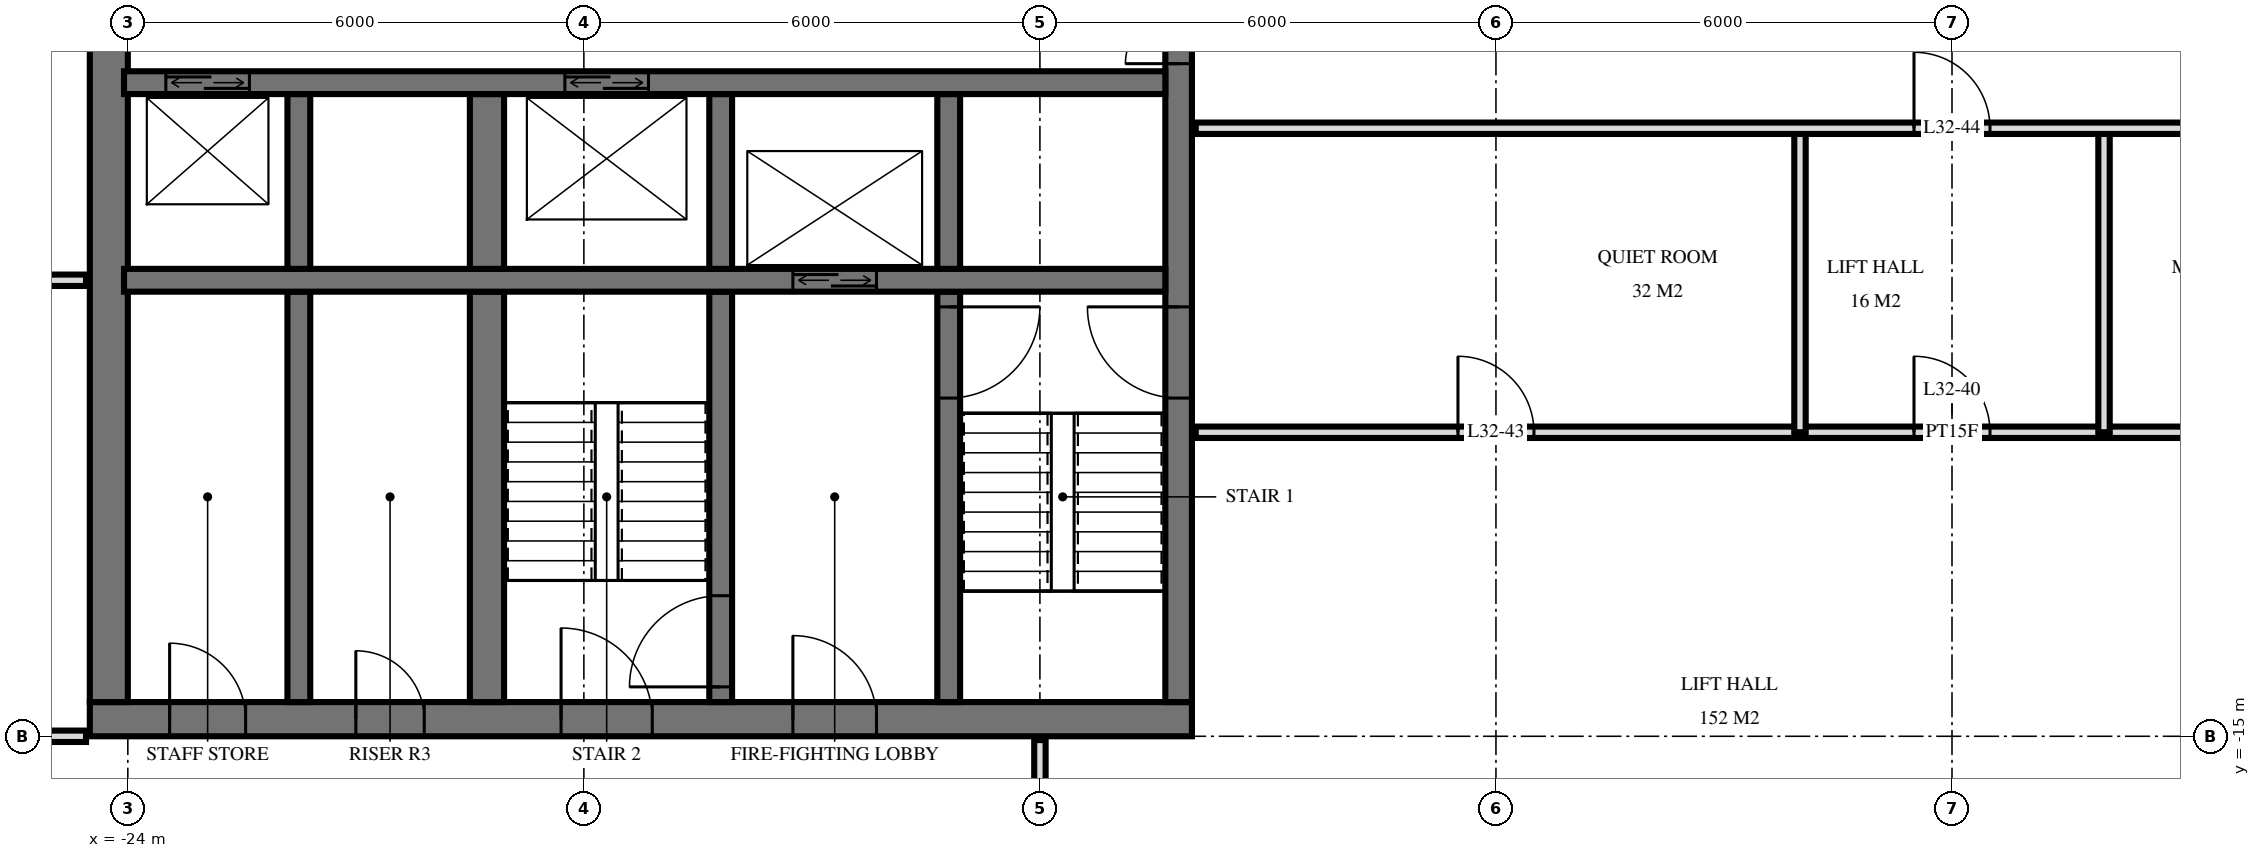
"""IFC4 building model, lengths in metres.
Left out: names, types, materials, properties, quantities, classifications, styles, units other than length and angle.
Written with IfcOpenShell. Run it as: python <this file> out.ifc"""

import sys

from ifc_helpers import new_model, si_unit, direction, frame, frame_2d, origin, place, context, subcontext, project, spatial, rectangle, extrude, element, fill, save


model = new_model("IFC4")
c1 = context("Model", 3, precision=1e-05, world=origin(), true_north=direction((0.0, 1.0)))
c2 = subcontext(c1, "Body", "Model", "MODEL_VIEW")
j1 = project(units=[si_unit("LENGTHUNIT", "METRE"), si_unit("PLANEANGLEUNIT", "RADIAN")], contexts=[c1])
p1 = place(None, origin())
s1 = spatial("IfcSite", under=j1, at=p1, CompositionType="ELEMENT")
p2 = place(p1, origin())
s2 = spatial("IfcBuilding", under=s1, at=p2, CompositionType="ELEMENT")
p3 = place(p2, frame((0.0, 0.0, 127.2)))
s3 = spatial("IfcBuildingStorey", under=s2, at=p3, CompositionType="ELEMENT", Elevation=127.2)
p4 = place(p3, frame((-24.5, -14.775, 0.0), z_axis=(0.0, 0.0, 1.0), x_axis=(1.0, 0.0, 0.0)))
e1 = element("IfcWall", 1, at=p4, inside=s3, PredefinedType="SHEAR", context=c2, shape_type="SweptSolid", body=[
    extrude(rectangle(XDim=14.5, YDim=0.45, at=frame_2d((7.25, 0.0))), origin(), (0.0, 0.0, 1.0), 3.6),
])
p5 = place(p4, frame((6.2, 0.0, 0.0)))
e2 = element("IfcOpeningElement", 2, at=p5, cuts=e1, PredefinedType="OPENING", context=c2, shape_type="SweptSolid", body=[
    extrude(rectangle(XDim=1.2, YDim=2.1, at=frame_2d((0.6, 1.05))), frame((0.0, 0.235, 0.0), z_axis=(0.0, -1.0, 0.0), x_axis=(1.0, 0.0, 0.0)), (0.0, 0.0, 1.0), 0.47),
])
p6 = place(p4, frame((9.25, 0.0, 0.0)))
e3 = element("IfcOpeningElement", 3, at=p6, cuts=e1, PredefinedType="OPENING", context=c2, shape_type="SweptSolid", body=[
    extrude(rectangle(XDim=1.1, YDim=2.1, at=frame_2d((0.55, 1.05))), frame((0.0, 0.235, 0.0), z_axis=(0.0, -1.0, 0.0), x_axis=(1.0, 0.0, 0.0)), (0.0, 0.0, 1.0), 0.47),
])
p7 = place(p4, frame((3.5, 0.0, 0.0)))
e4 = element("IfcOpeningElement", 4, at=p7, cuts=e1, PredefinedType="OPENING", context=c2, shape_type="SweptSolid", body=[
    extrude(rectangle(XDim=0.9, YDim=2.1, at=frame_2d((0.45, 1.05))), frame((0.0, 0.235, 0.0), z_axis=(0.0, -1.0, 0.0), x_axis=(1.0, 0.0, 0.0)), (0.0, 0.0, 1.0), 0.47),
])
p8 = place(p4, frame((1.05, 0.0, 0.0)))
e5 = element("IfcOpeningElement", 5, at=p8, cuts=e1, PredefinedType="OPENING", context=c2, shape_type="SweptSolid", body=[
    extrude(rectangle(XDim=1.0, YDim=2.1, at=frame_2d((0.5, 1.05))), frame((0.0, 0.235, 0.0), z_axis=(0.0, -1.0, 0.0), x_axis=(1.0, 0.0, 0.0)), (0.0, 0.0, 1.0), 0.47),
])
p9 = place(p3, frame((-10.175, -14.55, 0.0), z_axis=(0.0, 0.0, 1.0), x_axis=(0.0, 1.0, 0.0)))
e6 = element("IfcWall", 6, at=p9, inside=s3, PredefinedType="SHEAR", context=c2, shape_type="SweptSolid", body=[
    extrude(rectangle(XDim=14.1, YDim=0.35, at=frame_2d((7.05, 0.0))), origin(), (0.0, 0.0, 1.0), 3.6),
])
p10 = place(p9, frame((8.4, 0.0, 0.0)))
e7 = element("IfcOpeningElement", 7, at=p10, cuts=e6, PredefinedType="OPENING", context=c2, shape_type="SweptSolid", body=[
    extrude(rectangle(XDim=1.4, YDim=2.4, at=frame_2d((0.7, 1.2))), frame((0.0, 0.185, 0.0), z_axis=(0.0, -1.0, 0.0), x_axis=(1.0, 0.0, 0.0)), (0.0, 0.0, 1.0), 0.37),
])
p11 = place(p9, frame((10.0, 0.0, 0.0)))
e8 = element("IfcOpeningElement", 8, at=p11, cuts=e6, PredefinedType="OPENING", context=c2, shape_type="SweptSolid", body=[
    extrude(rectangle(XDim=1.4, YDim=2.4, at=frame_2d((0.7, 1.2))), frame((0.0, 0.185, 0.0), z_axis=(0.0, -1.0, 0.0), x_axis=(1.0, 0.0, 0.0)), (0.0, 0.0, 1.0), 0.37),
])
p12 = place(p9, frame((4.0, 0.0, 0.0)))
e9 = element("IfcOpeningElement", 9, at=p12, cuts=e6, PredefinedType="OPENING", context=c2, shape_type="SweptSolid", body=[
    extrude(rectangle(XDim=1.2, YDim=2.1, at=frame_2d((0.6, 1.05))), frame((0.0, 0.185, 0.0), z_axis=(0.0, -1.0, 0.0), x_axis=(1.0, 0.0, 0.0)), (0.0, 0.0, 1.0), 0.37),
])
p13 = place(p3, frame((-24.25, -14.55, 0.0), z_axis=(0.0, 0.0, 1.0), x_axis=(0.0, 1.0, 0.0)))
e10 = element("IfcWall", 10, at=p13, inside=s3, PredefinedType="SHEAR", context=c2, shape_type="SweptSolid", body=[
    extrude(rectangle(XDim=14.1, YDim=0.5, at=frame_2d((7.05, 0.0))), origin(), (0.0, 0.0, 1.0), 3.6),
])
p14 = place(p3, frame((-24.05, -6.4, 0.0), z_axis=(0.0, 0.0, 1.0), x_axis=(1.0, 0.0, 0.0)))
e11 = element("IfcWall", 11, at=p14, inside=s3, PredefinedType="SHEAR", context=c2, shape_type="SweptSolid", body=[
    extrude(rectangle(XDim=13.7, YDim=0.3, at=frame_2d((6.85, 0.0))), origin(), (0.0, 0.0, 1.0), 3.6),
])
p15 = place(p14, frame((0.55, 0.0, 0.0)))
e12 = element("IfcOpeningElement", 12, at=p15, cuts=e11, PredefinedType="OPENING", context=c2, shape_type="SweptSolid", body=[
    extrude(rectangle(XDim=1.1, YDim=2.1, at=frame_2d((0.55, 1.05))), frame((0.0, 0.16, 0.0), z_axis=(0.0, -1.0, 0.0), x_axis=(1.0, 0.0, 0.0)), (0.0, 0.0, 1.0), 0.32),
])
p16 = place(p14, frame((5.8, 0.0, 0.0)))
e13 = element("IfcOpeningElement", 13, at=p16, cuts=e11, PredefinedType="OPENING", context=c2, shape_type="SweptSolid", body=[
    extrude(rectangle(XDim=1.1, YDim=2.1, at=frame_2d((0.55, 1.05))), frame((0.0, 0.16, 0.0), z_axis=(0.0, -1.0, 0.0), x_axis=(1.0, 0.0, 0.0)), (0.0, 0.0, 1.0), 0.32),
])
p17 = place(p3, frame((-24.05, -9.0, 0.0), z_axis=(0.0, 0.0, 1.0), x_axis=(1.0, 0.0, 0.0)))
e14 = element("IfcWall", 14, at=p17, inside=s3, PredefinedType="SHEAR", context=c2, shape_type="SweptSolid", body=[
    extrude(rectangle(XDim=13.7, YDim=0.3, at=frame_2d((6.85, 0.0))), origin(), (0.0, 0.0, 1.0), 3.6),
])
p18 = place(p17, frame((8.8, 0.0, 0.0)))
e15 = element("IfcOpeningElement", 15, at=p18, cuts=e14, PredefinedType="OPENING", context=c2, shape_type="SweptSolid", body=[
    extrude(rectangle(XDim=1.1, YDim=2.1, at=frame_2d((0.55, 1.05))), frame((0.0, 0.16, 0.0), z_axis=(0.0, -1.0, 0.0), x_axis=(1.0, 0.0, 0.0)), (0.0, 0.0, 1.0), 0.32),
])
p19 = place(p3, frame((-13.2, -8.85, 0.0), z_axis=(0.0, 0.0, 1.0), x_axis=(0.0, 1.0, 0.0)))
e16 = element("IfcWall", 16, at=p19, inside=s3, PredefinedType="SHEAR", context=c2, shape_type="SweptSolid", body=[
    extrude(rectangle(XDim=2.3, YDim=0.3, at=frame_2d((1.15, 0.0))), origin(), (0.0, 0.0, 1.0), 3.6),
])
p20 = place(p3, frame((-13.2, -14.55, 0.0), z_axis=(0.0, 0.0, 1.0), x_axis=(0.0, 1.0, 0.0)))
e17 = element("IfcWall", 17, at=p20, inside=s3, PredefinedType="SHEAR", context=c2, shape_type="SweptSolid", body=[
    extrude(rectangle(XDim=5.4, YDim=0.3, at=frame_2d((2.7, 0.0))), origin(), (0.0, 0.0, 1.0), 3.6),
])
p21 = place(p20, frame((4.0, 0.0, 0.0)))
e18 = element("IfcOpeningElement", 18, at=p21, cuts=e17, PredefinedType="OPENING", context=c2, shape_type="SweptSolid", body=[
    extrude(rectangle(XDim=1.2, YDim=2.1, at=frame_2d((0.6, 1.05))), frame((0.0, 0.16, 0.0), z_axis=(0.0, -1.0, 0.0), x_axis=(1.0, 0.0, 0.0)), (0.0, 0.0, 1.0), 0.32),
])
p22 = place(p3, frame((-16.2, -8.85, 0.0), z_axis=(0.0, 0.0, 1.0), x_axis=(0.0, 1.0, 0.0)))
e19 = element("IfcWall", 19, at=p22, inside=s3, PredefinedType="SHEAR", context=c2, shape_type="SweptSolid", body=[
    extrude(rectangle(XDim=2.3, YDim=0.3, at=frame_2d((1.15, 0.0))), origin(), (0.0, 0.0, 1.0), 3.6),
])
p23 = place(p3, frame((-16.2, -14.55, 0.0), z_axis=(0.0, 0.0, 1.0), x_axis=(0.0, 1.0, 0.0)))
e20 = element("IfcWall", 20, at=p23, inside=s3, PredefinedType="SHEAR", context=c2, shape_type="SweptSolid", body=[
    extrude(rectangle(XDim=5.4, YDim=0.3, at=frame_2d((2.7, 0.0))), origin(), (0.0, 0.0, 1.0), 3.6),
])
p24 = place(p23, frame((0.2, 0.0, 0.0)))
e21 = element("IfcOpeningElement", 21, at=p24, cuts=e20, PredefinedType="OPENING", context=c2, shape_type="SweptSolid", body=[
    extrude(rectangle(XDim=1.2, YDim=2.1, at=frame_2d((0.6, 1.05))), frame((0.0, 0.16, 0.0), z_axis=(0.0, -1.0, 0.0), x_axis=(1.0, 0.0, 0.0)), (0.0, 0.0, 1.0), 0.32),
])
p25 = place(p3, frame((-19.275, -8.85, 0.0), z_axis=(0.0, 0.0, 1.0), x_axis=(0.0, 1.0, 0.0)))
e22 = element("IfcWall", 22, at=p25, inside=s3, PredefinedType="SHEAR", context=c2, shape_type="SweptSolid", body=[
    extrude(rectangle(XDim=2.3, YDim=0.45, at=frame_2d((1.15, 0.0))), origin(), (0.0, 0.0, 1.0), 3.6),
])
p26 = place(p3, frame((-19.275, -14.55, 0.0), z_axis=(0.0, 0.0, 1.0), x_axis=(0.0, 1.0, 0.0)))
e23 = element("IfcWall", 23, at=p26, inside=s3, PredefinedType="SHEAR", context=c2, shape_type="SweptSolid", body=[
    extrude(rectangle(XDim=5.4, YDim=0.45, at=frame_2d((2.7, 0.0))), origin(), (0.0, 0.0, 1.0), 3.6),
])
p27 = place(p3, frame((-21.75, -8.85, 0.0), z_axis=(0.0, 0.0, 1.0), x_axis=(0.0, 1.0, 0.0)))
e24 = element("IfcWall", 24, at=p27, inside=s3, PredefinedType="SHEAR", context=c2, shape_type="SweptSolid", body=[
    extrude(rectangle(XDim=2.3, YDim=0.3, at=frame_2d((1.15, 0.0))), origin(), (0.0, 0.0, 1.0), 3.6),
])
p28 = place(p3, frame((-21.75, -14.55, 0.0), z_axis=(0.0, 0.0, 1.0), x_axis=(0.0, 1.0, 0.0)))
e25 = element("IfcWall", 25, at=p28, inside=s3, PredefinedType="SHEAR", context=c2, shape_type="SweptSolid", body=[
    extrude(rectangle(XDim=5.4, YDim=0.3, at=frame_2d((2.7, 0.0))), origin(), (0.0, 0.0, 1.0), 3.6),
])
for number, where, z_axis, x_axis in (
    (26, (2.0, -11.0, 0.0), (0.0, 0.0, 1.0), (0.0, 1.0, 0.0)),
    (27, (-2.0, -11.0, 0.0), (0.0, 0.0, 1.0), (0.0, 1.0, 0.0)),
):
    element("IfcWall", number, at=place(p3, frame(where, z_axis=z_axis, x_axis=x_axis)), inside=s3, PredefinedType="PARTITIONING", context=c2, shape_type="SweptSolid", body=[
        extrude(rectangle(XDim=4.0, YDim=0.15, at=frame_2d((2.0, 0.0))), origin(), (0.0, 0.0, 1.0), 3.32),
    ])
p29 = place(p3, frame((-12.0, -18.0, 0.0), z_axis=(0.0, 0.0, 1.0), x_axis=(0.0, 1.0, 0.0)))
e28 = element("IfcWall", 28, at=p29, inside=s3, PredefinedType="PARTITIONING", context=c2, shape_type="SweptSolid", body=[
    extrude(rectangle(XDim=2.95, YDim=0.15, at=frame_2d((1.475, 0.0))), origin(), (0.0, 0.0, 1.0), 3.32),
])
p30 = place(p29, frame((1.0, 0.0, 0.0)))
e29 = element("IfcOpeningElement", 29, at=p30, cuts=e28, PredefinedType="OPENING", context=c2, shape_type="SweptSolid", body=[
    extrude(rectangle(XDim=1.0, YDim=2.1, at=frame_2d((0.5, 1.05))), frame((0.0, 0.085, 0.0), z_axis=(0.0, -1.0, 0.0), x_axis=(1.0, 0.0, 0.0)), (0.0, 0.0, 1.0), 0.17),
])
p31 = place(p3, frame((-28.02, -15.0, 0.0), z_axis=(0.0, 0.0, 1.0), x_axis=(1.0, 0.0, 0.0)))
e30 = element("IfcWall", 30, at=p31, inside=s3, PredefinedType="PARTITIONING", context=c2, shape_type="SweptSolid", body=[
    extrude(rectangle(XDim=3.47, YDim=0.15, at=frame_2d((1.735, 0.0))), origin(), (0.0, 0.0, 1.0), 3.32),
])
p32 = place(p31, frame((1.57, 0.0, 0.0)))
e31 = element("IfcOpeningElement", 31, at=p32, cuts=e30, PredefinedType="OPENING", context=c2, shape_type="SweptSolid", body=[
    extrude(rectangle(XDim=1.0, YDim=2.1, at=frame_2d((0.5, 1.05))), frame((0.0, 0.085, 0.0), z_axis=(0.0, -1.0, 0.0), x_axis=(1.0, 0.0, 0.0)), (0.0, 0.0, 1.0), 0.17),
])
p33 = place(p3, frame((-9.95, -11.0, 0.0), z_axis=(0.0, 0.0, 1.0), x_axis=(1.0, 0.0, 0.0)))
e32 = element("IfcWall", 32, at=p33, inside=s3, PredefinedType="PARTITIONING", context=c2, shape_type="SweptSolid", body=[
    extrude(rectangle(XDim=19.9, YDim=0.15, at=frame_2d((9.95, 0.0))), origin(), (0.0, 0.0, 1.0), 3.32),
])
p34 = place(p33, frame((9.45, 0.0, 0.0)))
e33 = element("IfcOpeningElement", 33, at=p34, cuts=e32, PredefinedType="OPENING", context=c2, shape_type="SweptSolid", body=[
    extrude(rectangle(XDim=1.0, YDim=2.1, at=frame_2d((0.5, 1.05))), frame((0.0, 0.085, 0.0), z_axis=(0.0, -1.0, 0.0), x_axis=(1.0, 0.0, 0.0)), (0.0, 0.0, 1.0), 0.17),
])
p35 = place(p33, frame((3.45, 0.0, 0.0)))
e34 = element("IfcOpeningElement", 34, at=p35, cuts=e32, PredefinedType="OPENING", context=c2, shape_type="SweptSolid", body=[
    extrude(rectangle(XDim=1.0, YDim=2.1, at=frame_2d((0.5, 1.05))), frame((0.0, 0.085, 0.0), z_axis=(0.0, -1.0, 0.0), x_axis=(1.0, 0.0, 0.0)), (0.0, 0.0, 1.0), 0.17),
])
p36 = place(p3, frame((-28.02, -9.0, 0.0), z_axis=(0.0, 0.0, 1.0), x_axis=(1.0, 0.0, 0.0)))
e35 = element("IfcWall", 35, at=p36, inside=s3, PredefinedType="PARTITIONING", context=c2, shape_type="SweptSolid", body=[
    extrude(rectangle(XDim=3.47, YDim=0.15, at=frame_2d((1.735, 0.0))), origin(), (0.0, 0.0, 1.0), 3.32),
])
p37 = place(p36, frame((1.22, 0.0, 0.0)))
e36 = element("IfcOpeningElement", 36, at=p37, cuts=e35, PredefinedType="OPENING", context=c2, shape_type="SweptSolid", body=[
    extrude(rectangle(XDim=0.9, YDim=2.1, at=frame_2d((0.45, 1.05))), frame((0.0, 0.085, 0.0), z_axis=(0.0, -1.0, 0.0), x_axis=(1.0, 0.0, 0.0)), (0.0, 0.0, 1.0), 0.17),
])
p38 = place(p3, frame((-9.95, -7.0, 0.0), z_axis=(0.0, 0.0, 1.0), x_axis=(1.0, 0.0, 0.0)))
e37 = element("IfcWall", 37, at=p38, inside=s3, PredefinedType="PARTITIONING", context=c2, shape_type="SweptSolid", body=[
    extrude(rectangle(XDim=19.9, YDim=0.15, at=frame_2d((9.95, 0.0))), origin(), (0.0, 0.0, 1.0), 3.32),
])
p39 = place(p38, frame((9.45, 0.0, 0.0)))
e38 = element("IfcOpeningElement", 38, at=p39, cuts=e37, PredefinedType="OPENING", context=c2, shape_type="SweptSolid", body=[
    extrude(rectangle(XDim=1.0, YDim=2.1, at=frame_2d((0.5, 1.05))), frame((0.0, 0.085, 0.0), z_axis=(0.0, -1.0, 0.0), x_axis=(1.0, 0.0, 0.0)), (0.0, 0.0, 1.0), 0.17),
])
p40 = place(p38, frame((15.45, 0.0, 0.0)))
e39 = element("IfcOpeningElement", 39, at=p40, cuts=e37, PredefinedType="OPENING", context=c2, shape_type="SweptSolid", body=[
    extrude(rectangle(XDim=1.0, YDim=2.1, at=frame_2d((0.5, 1.05))), frame((0.0, 0.085, 0.0), z_axis=(0.0, -1.0, 0.0), x_axis=(1.0, 0.0, 0.0)), (0.0, 0.0, 1.0), 0.17),
])
p41 = place(p15, origin())
e40 = element("IfcDoor", 40, at=p41, inside=s3, OperationType="DOUBLE_DOOR_SLIDING", PredefinedType="USERDEFINED", context=c2, shape_type="SweptSolid", body=[
    extrude(rectangle(XDim=1.1, YDim=2.1, at=frame_2d((0.55, 1.05))), frame((0.0, 0.025, 0.0), z_axis=(0.0, -1.0, 0.0), x_axis=(1.0, 0.0, 0.0)), (0.0, 0.0, 1.0), 0.05),
])
fill(e12, e40)
p42 = place(p18, origin())
e41 = element("IfcDoor", 41, at=p42, inside=s3, OperationType="DOUBLE_DOOR_SLIDING", PredefinedType="USERDEFINED", context=c2, shape_type="SweptSolid", body=[
    extrude(rectangle(XDim=1.1, YDim=2.1, at=frame_2d((0.55, 1.05))), frame((0.0, 0.025, 0.0), z_axis=(0.0, -1.0, 0.0), x_axis=(1.0, 0.0, 0.0)), (0.0, 0.0, 1.0), 0.05),
])
fill(e15, e41)
p43 = place(p16, origin())
e42 = element("IfcDoor", 42, at=p43, inside=s3, OperationType="DOUBLE_DOOR_SLIDING", PredefinedType="USERDEFINED", context=c2, shape_type="SweptSolid", body=[
    extrude(rectangle(XDim=1.1, YDim=2.1, at=frame_2d((0.55, 1.05))), frame((0.0, 0.025, 0.0), z_axis=(0.0, -1.0, 0.0), x_axis=(1.0, 0.0, 0.0)), (0.0, 0.0, 1.0), 0.05),
])
fill(e13, e42)
p44 = place(p10, origin())
e43 = element("IfcDoor", 43, at=p44, inside=s3, OperationType="DOUBLE_DOOR_SINGLE_SWING", PredefinedType="DOOR", context=c2, shape_type="SweptSolid", body=[
    extrude(rectangle(XDim=1.4, YDim=2.4, at=frame_2d((0.7, 1.2))), frame((0.0, 0.025, 0.0), z_axis=(0.0, -1.0, 0.0), x_axis=(1.0, 0.0, 0.0)), (0.0, 0.0, 1.0), 0.05),
])
fill(e7, e43)
p45 = place(p12, origin())
e44 = element("IfcDoor", 44, at=p45, inside=s3, OperationType="SINGLE_SWING_LEFT", PredefinedType="DOOR", context=c2, shape_type="SweptSolid", body=[
    extrude(rectangle(XDim=1.2, YDim=2.1, at=frame_2d((0.6, 1.05))), frame((0.0, 0.025, 0.0), z_axis=(0.0, -1.0, 0.0), x_axis=(1.0, 0.0, 0.0)), (0.0, 0.0, 1.0), 0.05),
])
fill(e9, e44)
p46 = place(p5, origin())
e45 = element("IfcDoor", 45, at=p46, inside=s3, OperationType="SINGLE_SWING_RIGHT", PredefinedType="DOOR", context=c2, shape_type="SweptSolid", body=[
    extrude(rectangle(XDim=1.2, YDim=2.1, at=frame_2d((0.6, 1.05))), frame((0.0, 0.025, 0.0), z_axis=(0.0, -1.0, 0.0), x_axis=(1.0, 0.0, 0.0)), (0.0, 0.0, 1.0), 0.05),
])
fill(e2, e45)
p47 = place(p6, origin())
e46 = element("IfcDoor", 46, at=p47, inside=s3, OperationType="SINGLE_SWING_RIGHT", PredefinedType="DOOR", context=c2, shape_type="SweptSolid", body=[
    extrude(rectangle(XDim=1.1, YDim=2.1, at=frame_2d((0.55, 1.05))), frame((0.0, 0.025, 0.0), z_axis=(0.0, -1.0, 0.0), x_axis=(1.0, 0.0, 0.0)), (0.0, 0.0, 1.0), 0.05),
])
fill(e3, e46)
p48 = place(p7, origin())
e47 = element("IfcDoor", 47, at=p48, inside=s3, OperationType="SINGLE_SWING_RIGHT", PredefinedType="DOOR", context=c2, shape_type="SweptSolid", body=[
    extrude(rectangle(XDim=0.9, YDim=2.1, at=frame_2d((0.45, 1.05))), frame((0.0, 0.025, 0.0), z_axis=(0.0, -1.0, 0.0), x_axis=(1.0, 0.0, 0.0)), (0.0, 0.0, 1.0), 0.05),
])
fill(e4, e47)
p49 = place(p8, origin())
e48 = element("IfcDoor", 48, at=p49, inside=s3, OperationType="SINGLE_SWING_RIGHT", PredefinedType="DOOR", context=c2, shape_type="SweptSolid", body=[
    extrude(rectangle(XDim=1.0, YDim=2.1, at=frame_2d((0.5, 1.05))), frame((0.0, 0.025, 0.0), z_axis=(0.0, -1.0, 0.0), x_axis=(1.0, 0.0, 0.0)), (0.0, 0.0, 1.0), 0.05),
])
fill(e5, e48)
p50 = place(p21, frame((0.6, 0.0, 0.0), z_axis=(0.0, 0.0, 1.0), x_axis=(-1.0, 0.0, 0.0)))
e49 = element("IfcDoor", 49, at=p50, inside=s3, OperationType="SINGLE_SWING_RIGHT", PredefinedType="DOOR", context=c2, shape_type="SweptSolid", body=[
    extrude(rectangle(XDim=1.2, YDim=2.1, at=frame_2d((0.0, 1.05))), frame((0.0, -0.025, 0.0), z_axis=(0.0, 1.0, 0.0), x_axis=(-1.0, 0.0, 0.0)), (0.0, 0.0, 1.0), 0.05),
])
fill(e18, e49)
p51 = place(p24, origin())
e50 = element("IfcDoor", 50, at=p51, inside=s3, OperationType="SINGLE_SWING_RIGHT", PredefinedType="DOOR", context=c2, shape_type="SweptSolid", body=[
    extrude(rectangle(XDim=1.2, YDim=2.1, at=frame_2d((0.6, 1.05))), frame((0.0, 0.025, 0.0), z_axis=(0.0, -1.0, 0.0), x_axis=(1.0, 0.0, 0.0)), (0.0, 0.0, 1.0), 0.05),
])
fill(e21, e50)
p52 = place(p34, origin())
e51 = element("IfcDoor", 51, at=p52, inside=s3, OperationType="SINGLE_SWING_RIGHT", PredefinedType="DOOR", context=c2, shape_type="SweptSolid", body=[
    extrude(rectangle(XDim=1.0, YDim=2.1, at=frame_2d((0.5, 1.05))), frame((0.0, 0.025, 0.0), z_axis=(0.0, -1.0, 0.0), x_axis=(1.0, 0.0, 0.0)), (0.0, 0.0, 1.0), 0.05),
])
fill(e33, e51)
p53 = place(p35, origin())
e52 = element("IfcDoor", 52, at=p53, inside=s3, OperationType="SINGLE_SWING_RIGHT", PredefinedType="DOOR", context=c2, shape_type="SweptSolid", body=[
    extrude(rectangle(XDim=1.0, YDim=2.1, at=frame_2d((0.5, 1.05))), frame((0.0, 0.025, 0.0), z_axis=(0.0, -1.0, 0.0), x_axis=(1.0, 0.0, 0.0)), (0.0, 0.0, 1.0), 0.05),
])
fill(e34, e52)
p54 = place(p39, origin())
e53 = element("IfcDoor", 53, at=p54, inside=s3, OperationType="SINGLE_SWING_RIGHT", PredefinedType="DOOR", context=c2, shape_type="SweptSolid", body=[
    extrude(rectangle(XDim=1.0, YDim=2.1, at=frame_2d((0.5, 1.05))), frame((0.0, 0.025, 0.0), z_axis=(0.0, -1.0, 0.0), x_axis=(1.0, 0.0, 0.0)), (0.0, 0.0, 1.0), 0.05),
])
fill(e38, e53)
save(model, sys.argv[1])
